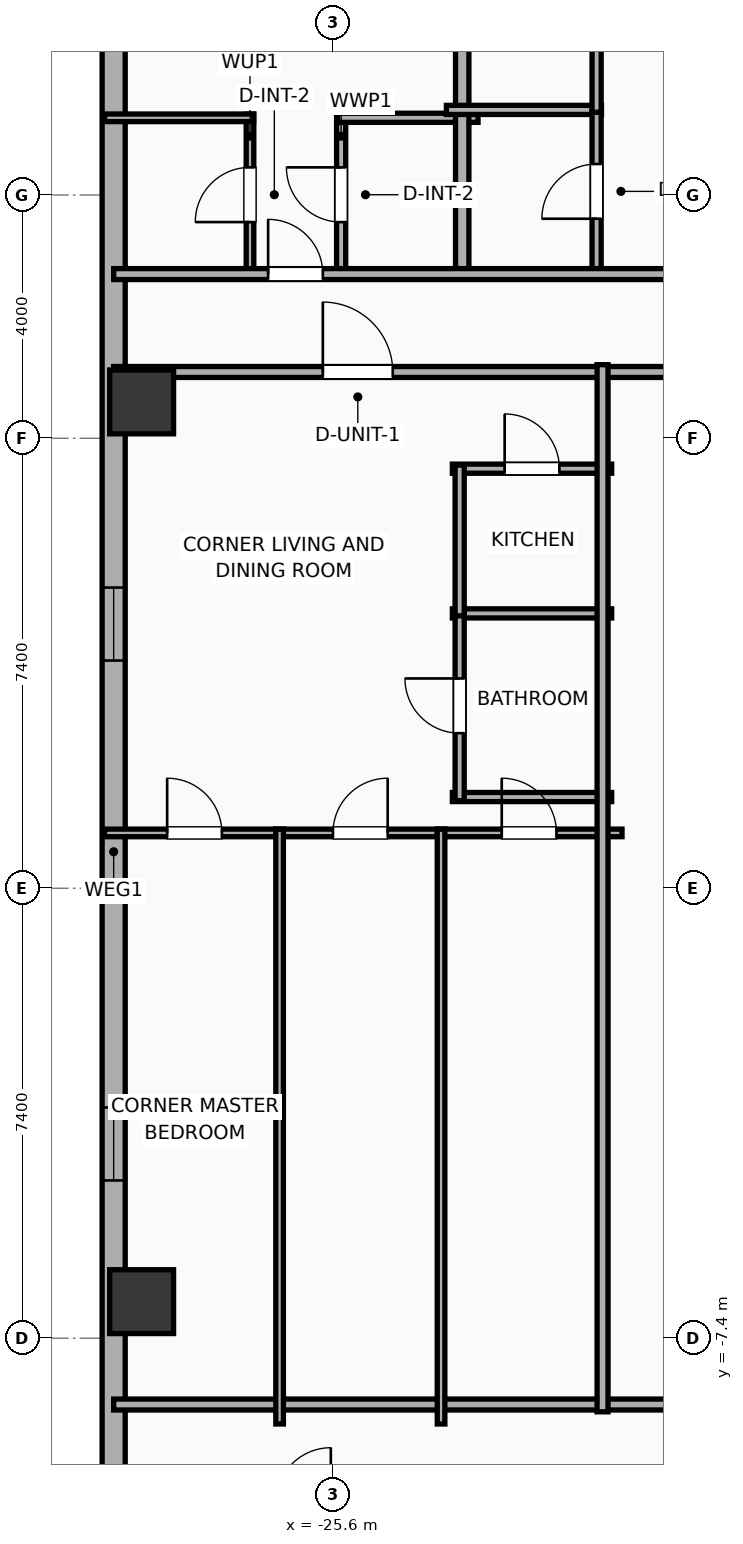
"""IFC4 building model, lengths in metres.
Left out: names, types, materials, properties, quantities, classifications, styles, units other than length and angle.
Written with IfcOpenShell. Run it as: python <this file> out.ifc"""

import sys

from ifc_helpers import new_model, si_unit, direction, frame, frame_2d, origin, origin_2d, place, context, subcontext, project, spatial, rectangle, hollow_rectangle, extrude, element, fill, save


model = new_model("IFC4")
c1 = context("Model", 3, precision=1e-05, world=origin(), true_north=direction((0.0, 1.0)))
c2 = subcontext(c1, "Body", "Model", "MODEL_VIEW")
j1 = project(units=[si_unit("LENGTHUNIT", "METRE"), si_unit("PLANEANGLEUNIT", "RADIAN")], contexts=[c1])
p1 = place(None, origin())
s1 = spatial("IfcSite", under=j1, at=p1, CompositionType="ELEMENT")
p2 = place(p1, origin())
s2 = spatial("IfcBuilding", under=s1, at=p2, CompositionType="ELEMENT")
p3 = place(p2, frame((0.0, 0.0, 124.8)))
s3 = spatial("IfcBuildingStorey", under=s2, at=p3, CompositionType="ELEMENT", Elevation=124.8)
for number, where, z_axis, x_axis in (
    (1, (-28.75, 7.998, 0.0), (0.0, 0.0, 1.0), (1.0, 0.0, 0.0)),
    (2, (-28.75, -6.798, 0.0), (0.0, 0.0, 1.0), (1.0, 0.0, 0.0)),
):
    element("IfcColumn", number, at=place(p3, frame(where, z_axis=z_axis, x_axis=x_axis)), inside=s3, PredefinedType="COLUMN", context=c2, shape_type="SweptSolid", body=[
        extrude(hollow_rectangle(XDim=1.05, YDim=1.05, WallThickness=0.036, at=origin_2d()), origin(), (0.0, 0.0, 1.0), 3.9),
    ])
p4 = place(p3, frame((-29.21, -16.581, 0.0), z_axis=(0.0, 0.0, 1.0), x_axis=(0.0, 1.0, 0.0)))
e3 = element("IfcWall", 3, at=p4, inside=s3, PredefinedType="ELEMENTEDWALL", context=c2, shape_type="SweptSolid", body=[
    extrude(rectangle(XDim=34.363, YDim=0.38, at=frame_2d((17.181, 0.0))), origin(), (0.0, 0.0, 1.0), 3.65),
])
p5 = place(p4, frame((30.757, 0.0, 0.75)))
e4 = element("IfcOpeningElement", 4, at=p5, cuts=e3, PredefinedType="OPENING", context=c2, shape_type="SweptSolid", body=[
    extrude(rectangle(XDim=1.2, YDim=2.05, at=frame_2d((0.6, 1.025))), frame((0.0, 0.2, 0.0), z_axis=(0.0, -1.0, 0.0), x_axis=(1.0, 0.0, 0.0)), (0.0, 0.0, 1.0), 0.4),
])
p6 = place(p4, frame((20.326, 0.0, 0.75)))
e5 = element("IfcOpeningElement", 5, at=p6, cuts=e3, PredefinedType="OPENING", context=c2, shape_type="SweptSolid", body=[
    extrude(rectangle(XDim=1.2, YDim=2.05, at=frame_2d((0.6, 1.025))), frame((0.0, 0.2, 0.0), z_axis=(0.0, -1.0, 0.0), x_axis=(1.0, 0.0, 0.0)), (0.0, 0.0, 1.0), 0.4),
])
p7 = place(p4, frame((11.776, 0.0, 0.75)))
e6 = element("IfcOpeningElement", 6, at=p7, cuts=e3, PredefinedType="OPENING", context=c2, shape_type="SweptSolid", body=[
    extrude(rectangle(XDim=1.2, YDim=2.05, at=frame_2d((0.6, 1.025))), frame((0.0, 0.2, 0.0), z_axis=(0.0, -1.0, 0.0), x_axis=(1.0, 0.0, 0.0)), (0.0, 0.0, 1.0), 0.4),
])
p8 = place(p3, frame((-29.21, 8.49, 0.0), z_axis=(0.0, 0.0, 1.0), x_axis=(1.0, 0.0, 0.0)))
e7 = element("IfcWall", 7, at=p8, inside=s3, PredefinedType="PARTITIONING", context=c2, shape_type="SweptSolid", body=[
    extrude(rectangle(XDim=19.33, YDim=0.18, at=frame_2d((9.665, 0.0))), origin(), (0.0, 0.0, 1.0), 3.65),
])
p9 = place(p8, frame((3.44, 0.0, 0.0)))
e8 = element("IfcOpeningElement", 8, at=p9, cuts=e7, PredefinedType="OPENING", context=c2, shape_type="SweptSolid", body=[
    extrude(rectangle(XDim=1.15, YDim=2.05, at=frame_2d((0.575, 1.025))), frame((0.0, 0.1, 0.0), z_axis=(0.0, -1.0, 0.0), x_axis=(1.0, 0.0, 0.0)), (0.0, 0.0, 1.0), 0.2),
])
p10 = place(p3, frame((-29.21, -8.49, 0.0), z_axis=(0.0, 0.0, 1.0), x_axis=(1.0, 0.0, 0.0)))
e9 = element("IfcWall", 9, at=p10, inside=s3, PredefinedType="PARTITIONING", context=c2, shape_type="SweptSolid", body=[
    extrude(rectangle(XDim=19.33, YDim=0.18, at=frame_2d((9.665, 0.0))), origin(), (0.0, 0.0, 1.0), 3.65),
])
p11 = place(p3, frame((-26.968, 10.08, 0.0), z_axis=(0.0, 0.0, 1.0), x_axis=(0.0, 1.0, 0.0)))
e10 = element("IfcWall", 10, at=p11, inside=s3, PredefinedType="PARTITIONING", context=c2, shape_type="SweptSolid", body=[
    extrude(rectangle(XDim=2.65, YDim=0.125, at=frame_2d((1.325, 0.0))), origin(), (0.0, 0.0, 1.0), 3.65),
])
p12 = place(p11, frame((0.875, 0.0, 0.0)))
e11 = element("IfcOpeningElement", 11, at=p12, cuts=e10, PredefinedType="OPENING", context=c2, shape_type="SweptSolid", body=[
    extrude(rectangle(XDim=0.9, YDim=2.05, at=frame_2d((0.45, 1.025))), frame((0.0, 0.073, 0.0), z_axis=(0.0, -1.0, 0.0), x_axis=(1.0, 0.0, 0.0)), (0.0, 0.0, 1.0), 0.145),
])
p13 = place(p3, frame((-25.469, 10.08, 0.0), z_axis=(0.0, 0.0, 1.0), x_axis=(0.0, 1.0, 0.0)))
e12 = element("IfcWall", 12, at=p13, inside=s3, PredefinedType="PLUMBINGWALL", context=c2, shape_type="SweptSolid", body=[
    extrude(rectangle(XDim=2.65, YDim=0.15, at=frame_2d((1.325, 0.0))), origin(), (0.0, 0.0, 1.0), 3.65),
])
p14 = place(p13, frame((0.875, 0.0, 0.0)))
e13 = element("IfcOpeningElement", 13, at=p14, cuts=e12, PredefinedType="OPENING", context=c2, shape_type="SweptSolid", body=[
    extrude(rectangle(XDim=0.9, YDim=2.05, at=frame_2d((0.45, 1.025))), frame((0.0, 0.085, 0.0), z_axis=(0.0, -1.0, 0.0), x_axis=(1.0, 0.0, 0.0)), (0.0, 0.0, 1.0), 0.17),
])
p15 = place(p3, frame((-29.36, 12.67, 0.0), z_axis=(0.0, 0.0, 1.0), x_axis=(1.0, 0.0, 0.0)))
e14 = element("IfcWall", 14, at=p15, inside=s3, PredefinedType="PARTITIONING", context=c2, shape_type="SweptSolid", body=[
    extrude(rectangle(XDim=2.452, YDim=0.125, at=frame_2d((1.226, 0.0))), origin(), (0.0, 0.0, 1.0), 3.65),
])
p16 = place(p3, frame((-25.529, 12.67, 0.0), z_axis=(0.0, 0.0, 1.0), x_axis=(1.0, 0.0, 0.0)))
e15 = element("IfcWall", 15, at=p16, inside=s3, PredefinedType="PLUMBINGWALL", context=c2, shape_type="SweptSolid", body=[
    extrude(rectangle(XDim=2.311, YDim=0.15, at=frame_2d((1.156, 0.0))), origin(), (0.0, 0.0, 1.0), 3.65),
])
p17 = place(p3, frame((-23.478, 10.02, 0.0), z_axis=(0.0, 0.0, 1.0), x_axis=(0.0, 1.0, 0.0)))
e16 = element("IfcWall", 16, at=p17, inside=s3, PredefinedType="PARTITIONING", context=c2, shape_type="SweptSolid", body=[
    extrude(rectangle(XDim=11.59, YDim=0.22, at=frame_2d((5.795, 0.0))), origin(), (0.0, 0.0, 1.0), 3.65),
])
p18 = place(p3, frame((-23.738, 12.8, 0.0), z_axis=(0.0, 0.0, 1.0), x_axis=(1.0, 0.0, 0.0)))
e17 = element("IfcWall", 17, at=p18, inside=s3, PredefinedType="PLUMBINGWALL", context=c2, shape_type="SweptSolid", body=[
    extrude(rectangle(XDim=2.55, YDim=0.15, at=frame_2d((1.275, 0.0))), origin(), (0.0, 0.0, 1.0), 3.65),
])
p19 = place(p3, frame((-21.268, 10.08, 0.0), z_axis=(0.0, 0.0, 1.0), x_axis=(0.0, 1.0, 0.0)))
e18 = element("IfcWall", 18, at=p19, inside=s3, PredefinedType="PLUMBINGWALL", context=c2, shape_type="SweptSolid", body=[
    extrude(rectangle(XDim=2.76, YDim=0.15, at=frame_2d((1.38, 0.0))), origin(), (0.0, 0.0, 1.0), 3.65),
])
p20 = place(p19, frame((0.93, 0.0, 0.0)))
e19 = element("IfcOpeningElement", 19, at=p20, cuts=e18, PredefinedType="OPENING", context=c2, shape_type="SweptSolid", body=[
    extrude(rectangle(XDim=0.9, YDim=2.05, at=frame_2d((0.45, 1.025))), frame((0.0, 0.085, 0.0), z_axis=(0.0, -1.0, 0.0), x_axis=(1.0, 0.0, 0.0)), (0.0, 0.0, 1.0), 0.17),
])
p21 = place(p3, frame((-21.268, 12.76, 0.0), z_axis=(0.0, 0.0, 1.0), x_axis=(0.0, 1.0, 0.0)))
e20 = element("IfcWall", 20, at=p21, inside=s3, PredefinedType="PLUMBINGWALL", context=c2, shape_type="SweptSolid", body=[
    extrude(rectangle(XDim=8.898, YDim=0.15, at=frame_2d((4.449, 0.0))), origin(), (0.0, 0.0, 1.0), 3.65),
])
p22 = place(p21, frame((3.999, 0.0, 0.0)))
e21 = element("IfcOpeningElement", 21, at=p22, cuts=e20, PredefinedType="OPENING", context=c2, shape_type="SweptSolid", body=[
    extrude(rectangle(XDim=0.9, YDim=2.05, at=frame_2d((0.45, 1.025))), frame((0.0, 0.085, 0.0), z_axis=(0.0, -1.0, 0.0), x_axis=(1.0, 0.0, 0.0)), (0.0, 0.0, 1.0), 0.17),
])
p23 = place(p3, frame((-29.21, 10.1, 0.0), z_axis=(0.0, 0.0, 1.0), x_axis=(1.0, 0.0, 0.0)))
e22 = element("IfcWall", 22, at=p23, inside=s3, PredefinedType="PARTITIONING", context=c2, shape_type="SweptSolid", body=[
    extrude(rectangle(XDim=62.42, YDim=0.18, at=frame_2d((31.21, 0.0))), origin(), (0.0, 0.0, 1.0), 3.65),
])
p24 = place(p23, frame((2.54, 0.0, 0.0)))
e23 = element("IfcOpeningElement", 23, at=p24, cuts=e22, PredefinedType="OPENING", context=c2, shape_type="SweptSolid", body=[
    extrude(rectangle(XDim=0.9, YDim=2.05, at=frame_2d((0.45, 1.025))), frame((0.0, 0.1, 0.0), z_axis=(0.0, -1.0, 0.0), x_axis=(1.0, 0.0, 0.0)), (0.0, 0.0, 1.0), 0.2),
])
p25 = place(p23, frame((9.1, 0.0, 0.0)))
e24 = element("IfcOpeningElement", 24, at=p25, cuts=e22, PredefinedType="OPENING", context=c2, shape_type="SweptSolid", body=[
    extrude(rectangle(XDim=1.15, YDim=2.05, at=frame_2d((0.575, 1.025))), frame((0.0, 0.1, 0.0), z_axis=(0.0, -1.0, 0.0), x_axis=(1.0, 0.0, 0.0)), (0.0, 0.0, 1.0), 0.2),
])
p26 = place(p23, frame((14.063, 0.0, 0.0)))
e25 = element("IfcOpeningElement", 25, at=p26, cuts=e22, PredefinedType="OPENING", context=c2, shape_type="SweptSolid", body=[
    extrude(rectangle(XDim=0.9, YDim=2.05, at=frame_2d((0.45, 1.025))), frame((0.0, 0.1, 0.0), z_axis=(0.0, -1.0, 0.0), x_axis=(1.0, 0.0, 0.0)), (0.0, 0.0, 1.0), 0.2),
])
p27 = place(p23, frame((20.954, 0.0, 0.0)))
e26 = element("IfcOpeningElement", 26, at=p27, cuts=e22, PredefinedType="OPENING", context=c2, shape_type="SweptSolid", body=[
    extrude(rectangle(XDim=1.15, YDim=2.05, at=frame_2d((0.575, 1.025))), frame((0.0, 0.1, 0.0), z_axis=(0.0, -1.0, 0.0), x_axis=(1.0, 0.0, 0.0)), (0.0, 0.0, 1.0), 0.2),
])
p28 = place(p23, frame((26.26, 0.0, 0.0)))
e27 = element("IfcOpeningElement", 27, at=p28, cuts=e22, PredefinedType="OPENING", context=c2, shape_type="SweptSolid", body=[
    extrude(rectangle(XDim=0.9, YDim=2.05, at=frame_2d((0.45, 1.025))), frame((0.0, 0.1, 0.0), z_axis=(0.0, -1.0, 0.0), x_axis=(1.0, 0.0, 0.0)), (0.0, 0.0, 1.0), 0.2),
])
p29 = place(p23, frame((31.01, 0.0, 0.0)))
e28 = element("IfcOpeningElement", 28, at=p29, cuts=e22, PredefinedType="OPENING", context=c2, shape_type="SweptSolid", body=[
    extrude(rectangle(XDim=1.15, YDim=2.05, at=frame_2d((0.575, 1.025))), frame((0.0, 0.1, 0.0), z_axis=(0.0, -1.0, 0.0), x_axis=(1.0, 0.0, 0.0)), (0.0, 0.0, 1.0), 0.2),
])
p30 = place(p23, frame((37.37, 0.0, 0.0)))
e29 = element("IfcOpeningElement", 29, at=p30, cuts=e22, PredefinedType="OPENING", context=c2, shape_type="SweptSolid", body=[
    extrude(rectangle(XDim=1.15, YDim=2.05, at=frame_2d((0.575, 1.025))), frame((0.0, 0.1, 0.0), z_axis=(0.0, -1.0, 0.0), x_axis=(1.0, 0.0, 0.0)), (0.0, 0.0, 1.0), 0.2),
])
p31 = place(p23, frame((45.298, 0.0, 0.0)))
e30 = element("IfcOpeningElement", 30, at=p31, cuts=e22, PredefinedType="OPENING", context=c2, shape_type="SweptSolid", body=[
    extrude(rectangle(XDim=0.9, YDim=2.05, at=frame_2d((0.45, 1.025))), frame((0.0, 0.1, 0.0), z_axis=(0.0, -1.0, 0.0), x_axis=(1.0, 0.0, 0.0)), (0.0, 0.0, 1.0), 0.2),
])
p32 = place(p23, frame((52.033, 0.0, 0.0)))
e31 = element("IfcOpeningElement", 31, at=p32, cuts=e22, PredefinedType="OPENING", context=c2, shape_type="SweptSolid", body=[
    extrude(rectangle(XDim=0.9, YDim=2.05, at=frame_2d((0.45, 1.025))), frame((0.0, 0.1, 0.0), z_axis=(0.0, -1.0, 0.0), x_axis=(1.0, 0.0, 0.0)), (0.0, 0.0, 1.0), 0.2),
])
p33 = place(p23, frame((58.805, 0.0, 0.0)))
e32 = element("IfcOpeningElement", 32, at=p33, cuts=e22, PredefinedType="OPENING", context=c2, shape_type="SweptSolid", body=[
    extrude(rectangle(XDim=0.9, YDim=2.05, at=frame_2d((0.45, 1.025))), frame((0.0, 0.1, 0.0), z_axis=(0.0, -1.0, 0.0), x_axis=(1.0, 0.0, 0.0)), (0.0, 0.0, 1.0), 0.2),
])
p34 = place(p3, frame((-23.64, 6.9, 0.0), z_axis=(0.0, 0.0, 1.0), x_axis=(1.0, 0.0, 0.0)))
e33 = element("IfcWall", 33, at=p34, inside=s3, PredefinedType="PLUMBINGWALL", context=c2, shape_type="SweptSolid", body=[
    extrude(rectangle(XDim=2.62, YDim=0.15, at=frame_2d((1.31, 0.0))), origin(), (0.0, 0.0, 1.0), 3.65),
])
p35 = place(p34, frame((0.86, 0.0, 0.0)))
e34 = element("IfcOpeningElement", 34, at=p35, cuts=e33, PredefinedType="OPENING", context=c2, shape_type="SweptSolid", body=[
    extrude(rectangle(XDim=0.9, YDim=2.05, at=frame_2d((0.45, 1.025))), frame((0.0, 0.085, 0.0), z_axis=(0.0, -1.0, 0.0), x_axis=(1.0, 0.0, 0.0)), (0.0, 0.0, 1.0), 0.17),
])
for number, where, z_axis, x_axis in (
    (35, (-23.64, 4.52, 0.0), (0.0, 0.0, 1.0), (1.0, 0.0, 0.0)),
    (36, (-23.64, 1.5, 0.0), (0.0, 0.0, 1.0), (1.0, 0.0, 0.0)),
):
    element("IfcWall", number, at=place(p3, frame(where, z_axis=z_axis, x_axis=x_axis)), inside=s3, PredefinedType="PLUMBINGWALL", context=c2, shape_type="SweptSolid", body=[
        extrude(rectangle(XDim=2.62, YDim=0.15, at=frame_2d((1.31, 0.0))), origin(), (0.0, 0.0, 1.0), 3.65),
    ])
p36 = place(p3, frame((-23.52, 1.44, 0.0), z_axis=(0.0, 0.0, 1.0), x_axis=(0.0, 1.0, 0.0)))
e37 = element("IfcWall", 37, at=p36, inside=s3, PredefinedType="PLUMBINGWALL", context=c2, shape_type="SweptSolid", body=[
    extrude(rectangle(XDim=3.12, YDim=0.15, at=frame_2d((1.56, 0.0))), origin(), (0.0, 0.0, 1.0), 3.65),
])
p37 = place(p36, frame((1.11, 0.0, 0.0)))
e38 = element("IfcOpeningElement", 38, at=p37, cuts=e37, PredefinedType="OPENING", context=c2, shape_type="SweptSolid", body=[
    extrude(rectangle(XDim=0.9, YDim=2.05, at=frame_2d((0.45, 1.025))), frame((0.0, 0.085, 0.0), z_axis=(0.0, -1.0, 0.0), x_axis=(1.0, 0.0, 0.0)), (0.0, 0.0, 1.0), 0.17),
])
p38 = place(p3, frame((-23.52, 4.48, 0.0), z_axis=(0.0, 0.0, 1.0), x_axis=(0.0, 1.0, 0.0)))
e39 = element("IfcWall", 39, at=p38, inside=s3, PredefinedType="PLUMBINGWALL", context=c2, shape_type="SweptSolid", body=[
    extrude(rectangle(XDim=2.48, YDim=0.15, at=frame_2d((1.24, 0.0))), origin(), (0.0, 0.0, 1.0), 3.65),
])
p39 = place(p3, frame((-29.36, 0.91, 0.0), z_axis=(0.0, 0.0, 1.0), x_axis=(1.0, 0.0, 0.0)))
e40 = element("IfcWall", 40, at=p39, inside=s3, PredefinedType="PARTITIONING", context=c2, shape_type="SweptSolid", body=[
    extrude(rectangle(XDim=2.942, YDim=0.125, at=frame_2d((1.471, 0.0))), origin(), (0.0, 0.0, 1.0), 3.65),
])
p40 = place(p39, frame((1.03, 0.0, 0.0)))
e41 = element("IfcOpeningElement", 41, at=p40, cuts=e40, PredefinedType="OPENING", context=c2, shape_type="SweptSolid", body=[
    extrude(rectangle(XDim=0.9, YDim=2.05, at=frame_2d((0.45, 1.025))), frame((0.0, 0.073, 0.0), z_axis=(0.0, -1.0, 0.0), x_axis=(1.0, 0.0, 0.0)), (0.0, 0.0, 1.0), 0.145),
])
p41 = place(p3, frame((-26.543, 0.91, 0.0), z_axis=(0.0, 0.0, 1.0), x_axis=(1.0, 0.0, 0.0)))
e42 = element("IfcWall", 42, at=p41, inside=s3, PredefinedType="PARTITIONING", context=c2, shape_type="SweptSolid", body=[
    extrude(rectangle(XDim=2.78, YDim=0.125, at=frame_2d((1.39, 0.0))), origin(), (0.0, 0.0, 1.0), 3.65),
])
p42 = place(p41, frame((0.94, 0.0, 0.0)))
e43 = element("IfcOpeningElement", 43, at=p42, cuts=e42, PredefinedType="OPENING", context=c2, shape_type="SweptSolid", body=[
    extrude(rectangle(XDim=0.9, YDim=2.05, at=frame_2d((0.45, 1.025))), frame((0.0, 0.073, 0.0), z_axis=(0.0, -1.0, 0.0), x_axis=(1.0, 0.0, 0.0)), (0.0, 0.0, 1.0), 0.145),
])
p43 = place(p3, frame((-23.888, 0.91, 0.0), z_axis=(0.0, 0.0, 1.0), x_axis=(1.0, 0.0, 0.0)))
e44 = element("IfcWall", 44, at=p43, inside=s3, PredefinedType="PARTITIONING", context=c2, shape_type="SweptSolid", body=[
    extrude(rectangle(XDim=3.038, YDim=0.125, at=frame_2d((1.519, 0.0))), origin(), (0.0, 0.0, 1.0), 3.65),
])
p44 = place(p43, frame((1.061, 0.0, 0.0)))
e45 = element("IfcOpeningElement", 45, at=p44, cuts=e44, PredefinedType="OPENING", context=c2, shape_type="SweptSolid", body=[
    extrude(rectangle(XDim=0.9, YDim=2.05, at=frame_2d((0.45, 1.025))), frame((0.0, 0.073, 0.0), z_axis=(0.0, -1.0, 0.0), x_axis=(1.0, 0.0, 0.0)), (0.0, 0.0, 1.0), 0.145),
])
for number, where, z_axis, x_axis in (
    (46, (-23.826, -8.81, 0.0), (0.0, 0.0, 1.0), (0.0, 1.0, 0.0)),
    (47, (-26.481, -8.81, 0.0), (0.0, 0.0, 1.0), (0.0, 1.0, 0.0)),
):
    element("IfcWall", number, at=place(p3, frame(where, z_axis=z_axis, x_axis=x_axis)), inside=s3, PredefinedType="PARTITIONING", context=c2, shape_type="SweptSolid", body=[
        extrude(rectangle(XDim=9.78, YDim=0.125, at=frame_2d((4.89, 0.0))), origin(), (0.0, 0.0, 1.0), 3.65),
    ])
p45 = place(p3, frame((-21.17, -8.61, 0.0), z_axis=(0.0, 0.0, 1.0), x_axis=(0.0, 1.0, 0.0)))
e48 = element("IfcWall", 48, at=p45, inside=s3, PredefinedType="PARTITIONING", context=c2, shape_type="SweptSolid", body=[
    extrude(rectangle(XDim=17.22, YDim=0.18, at=frame_2d((8.61, 0.0))), origin(), (0.0, 0.0, 1.0), 3.65),
])
p46 = place(p6, origin())
e49 = element("IfcWindow", 49, at=p46, inside=s3, PartitioningType="SINGLE_PANEL", PredefinedType="WINDOW", context=c2, shape_type="SweptSolid", body=[
    extrude(rectangle(XDim=1.2, YDim=2.05, at=frame_2d((0.6, 1.025))), frame((0.0, 0.03, 0.0), z_axis=(0.0, -1.0, 0.0), x_axis=(1.0, 0.0, 0.0)), (0.0, 0.0, 1.0), 0.06),
])
fill(e5, e49)
p47 = place(p7, origin())
e50 = element("IfcWindow", 50, at=p47, inside=s3, PartitioningType="SINGLE_PANEL", PredefinedType="WINDOW", context=c2, shape_type="SweptSolid", body=[
    extrude(rectangle(XDim=1.2, YDim=2.05, at=frame_2d((0.6, 1.025))), frame((0.0, 0.03, 0.0), z_axis=(0.0, -1.0, 0.0), x_axis=(1.0, 0.0, 0.0)), (0.0, 0.0, 1.0), 0.06),
])
fill(e6, e50)
p48 = place(p9, origin())
e51 = element("IfcDoor", 51, at=p48, inside=s3, OperationType="SINGLE_SWING_LEFT", PredefinedType="DOOR", context=c2, shape_type="SweptSolid", body=[
    extrude(rectangle(XDim=1.15, YDim=2.05, at=frame_2d((0.575, 1.025))), frame((0.0, 0.025, 0.0), z_axis=(0.0, -1.0, 0.0), x_axis=(1.0, 0.0, 0.0)), (0.0, 0.0, 1.0), 0.05),
])
fill(e8, e51)
p49 = place(p12, origin())
e52 = element("IfcDoor", 52, at=p49, inside=s3, OperationType="SINGLE_SWING_LEFT", PredefinedType="DOOR", context=c2, shape_type="SweptSolid", body=[
    extrude(rectangle(XDim=0.9, YDim=2.05, at=frame_2d((0.45, 1.025))), frame((0.0, 0.025, 0.0), z_axis=(0.0, -1.0, 0.0), x_axis=(1.0, 0.0, 0.0)), (0.0, 0.0, 1.0), 0.05),
])
fill(e11, e52)
p50 = place(p14, origin())
e53 = element("IfcDoor", 53, at=p50, inside=s3, OperationType="SINGLE_SWING_RIGHT", PredefinedType="DOOR", context=c2, shape_type="SweptSolid", body=[
    extrude(rectangle(XDim=0.9, YDim=2.05, at=frame_2d((0.45, 1.025))), frame((0.0, 0.025, 0.0), z_axis=(0.0, -1.0, 0.0), x_axis=(1.0, 0.0, 0.0)), (0.0, 0.0, 1.0), 0.05),
])
fill(e13, e53)
p51 = place(p20, origin())
e54 = element("IfcDoor", 54, at=p51, inside=s3, OperationType="SINGLE_SWING_LEFT", PredefinedType="DOOR", context=c2, shape_type="SweptSolid", body=[
    extrude(rectangle(XDim=0.9, YDim=2.05, at=frame_2d((0.45, 1.025))), frame((0.0, 0.025, 0.0), z_axis=(0.0, -1.0, 0.0), x_axis=(1.0, 0.0, 0.0)), (0.0, 0.0, 1.0), 0.05),
])
fill(e19, e54)
p52 = place(p24, origin())
e55 = element("IfcDoor", 55, at=p52, inside=s3, OperationType="SINGLE_SWING_LEFT", PredefinedType="DOOR", context=c2, shape_type="SweptSolid", body=[
    extrude(rectangle(XDim=0.9, YDim=2.05, at=frame_2d((0.45, 1.025))), frame((0.0, 0.025, 0.0), z_axis=(0.0, -1.0, 0.0), x_axis=(1.0, 0.0, 0.0)), (0.0, 0.0, 1.0), 0.05),
])
fill(e23, e55)
p53 = place(p35, origin())
e56 = element("IfcDoor", 56, at=p53, inside=s3, OperationType="SINGLE_SWING_LEFT", PredefinedType="DOOR", context=c2, shape_type="SweptSolid", body=[
    extrude(rectangle(XDim=0.9, YDim=2.05, at=frame_2d((0.45, 1.025))), frame((0.0, 0.025, 0.0), z_axis=(0.0, -1.0, 0.0), x_axis=(1.0, 0.0, 0.0)), (0.0, 0.0, 1.0), 0.05),
])
fill(e34, e56)
p54 = place(p37, origin())
e57 = element("IfcDoor", 57, at=p54, inside=s3, OperationType="SINGLE_SWING_RIGHT", PredefinedType="DOOR", context=c2, shape_type="SweptSolid", body=[
    extrude(rectangle(XDim=0.9, YDim=2.05, at=frame_2d((0.45, 1.025))), frame((0.0, 0.025, 0.0), z_axis=(0.0, -1.0, 0.0), x_axis=(1.0, 0.0, 0.0)), (0.0, 0.0, 1.0), 0.05),
])
fill(e38, e57)
p55 = place(p40, origin())
e58 = element("IfcDoor", 58, at=p55, inside=s3, OperationType="SINGLE_SWING_LEFT", PredefinedType="DOOR", context=c2, shape_type="SweptSolid", body=[
    extrude(rectangle(XDim=0.9, YDim=2.05, at=frame_2d((0.45, 1.025))), frame((0.0, 0.025, 0.0), z_axis=(0.0, -1.0, 0.0), x_axis=(1.0, 0.0, 0.0)), (0.0, 0.0, 1.0), 0.05),
])
fill(e41, e58)
p56 = place(p42, origin())
e59 = element("IfcDoor", 59, at=p56, inside=s3, OperationType="SINGLE_SWING_RIGHT", PredefinedType="DOOR", context=c2, shape_type="SweptSolid", body=[
    extrude(rectangle(XDim=0.9, YDim=2.05, at=frame_2d((0.45, 1.025))), frame((0.0, 0.025, 0.0), z_axis=(0.0, -1.0, 0.0), x_axis=(1.0, 0.0, 0.0)), (0.0, 0.0, 1.0), 0.05),
])
fill(e43, e59)
p57 = place(p44, origin())
e60 = element("IfcDoor", 60, at=p57, inside=s3, OperationType="SINGLE_SWING_LEFT", PredefinedType="DOOR", context=c2, shape_type="SweptSolid", body=[
    extrude(rectangle(XDim=0.9, YDim=2.05, at=frame_2d((0.45, 1.025))), frame((0.0, 0.025, 0.0), z_axis=(0.0, -1.0, 0.0), x_axis=(1.0, 0.0, 0.0)), (0.0, 0.0, 1.0), 0.05),
])
fill(e45, e60)
save(model, sys.argv[1])
